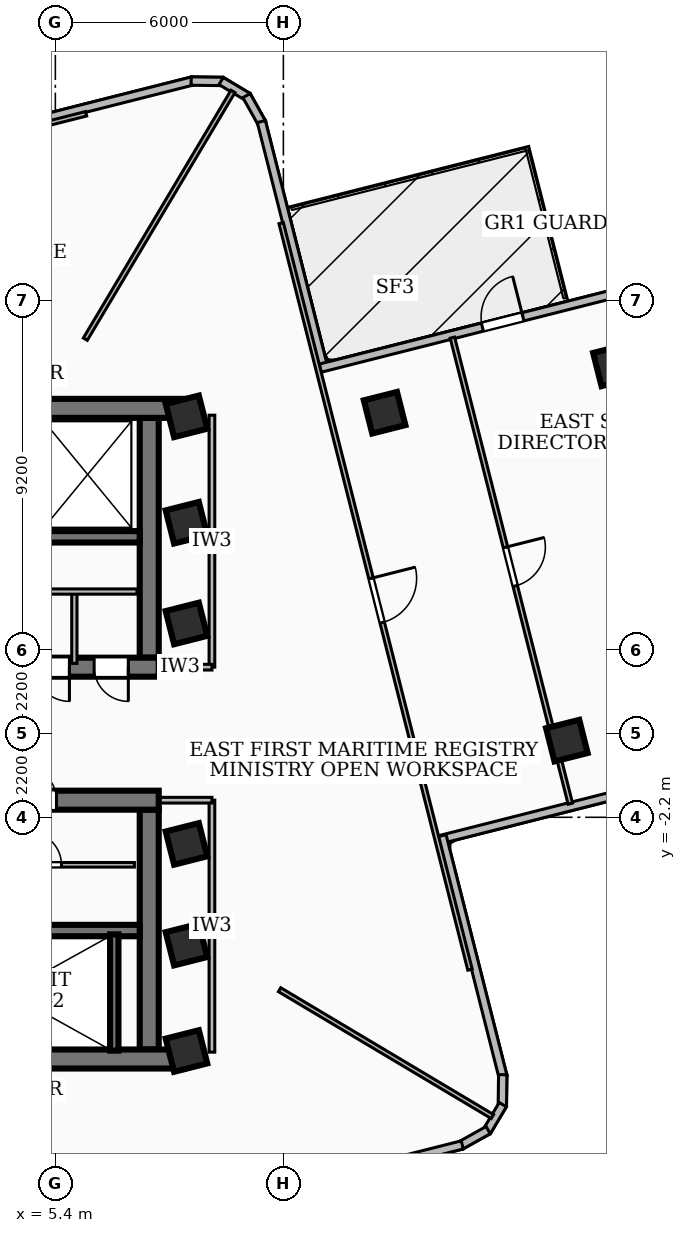
"""IFC4 building model, lengths in metres.
Left out: names, types, materials, properties, quantities, classifications, styles, units other than length and angle.
Written with IfcOpenShell. Run it as: python <this file> out.ifc"""

import sys

from ifc_helpers import new_model, si_unit, direction, frame, frame_2d, origin, origin_2d, place, context, subcontext, project, spatial, rectangle, extrude, element, fill, save


model = new_model("IFC4")
c1 = context("Model", 3, precision=1e-05, world=origin(), true_north=direction((0.0, 1.0)))
c2 = subcontext(c1, "Body", "Model", "MODEL_VIEW")
j1 = project(units=[si_unit("LENGTHUNIT", "METRE"), si_unit("PLANEANGLEUNIT", "RADIAN")], contexts=[c1])
p1 = place(None, origin())
s1 = spatial("IfcSite", under=j1, at=p1, CompositionType="ELEMENT")
p2 = place(p1, origin())
s2 = spatial("IfcBuilding", under=s1, at=p2, CompositionType="ELEMENT")
p3 = place(p2, frame((0.0, 0.0, 127.08)))
s3 = spatial("IfcBuildingStorey", under=s2, at=p3, CompositionType="ELEMENT", Elevation=127.08)
p4 = place(p3, frame((-8.78, 8.56, 0.0), z_axis=(0.0, 0.0, 1.0), x_axis=(1.0, 0.0, 0.0)))
e1 = element("IfcWall", 1, at=p4, inside=s3, PredefinedType="SHEAR", context=c2, shape_type="SweptSolid", body=[
    extrude(rectangle(XDim=17.56, YDim=0.5, at=frame_2d((8.78, 0.0))), origin(), (0.0, 0.0, 1.0), 3.34),
])
p5 = place(p3, frame((8.12, 1.75, 0.0), z_axis=(0.0, 0.0, 1.0), x_axis=(-1.0, 0.0, 0.0)))
e2 = element("IfcWall", 2, at=p5, inside=s3, PredefinedType="SHEAR", context=c2, shape_type="SweptSolid", body=[
    extrude(rectangle(XDim=16.24, YDim=0.5, at=frame_2d((8.12, 0.0))), origin(), (0.0, 0.0, 1.0), 3.34),
])
p6 = place(p5, frame((7.45, 0.0, 0.0)))
e3 = element("IfcOpeningElement", 3, at=p6, cuts=e2, PredefinedType="OPENING", context=c2, shape_type="SweptSolid", body=[
    extrude(rectangle(XDim=1.0, YDim=2.1, at=frame_2d((0.5, 1.05))), frame((0.0, 0.26, 0.0), z_axis=(0.0, -1.0, 0.0), x_axis=(1.0, 0.0, 0.0)), (0.0, 0.0, 1.0), 0.52),
])
p7 = place(p5, frame((3.85, 0.0, 0.0)))
e4 = element("IfcOpeningElement", 4, at=p7, cuts=e2, PredefinedType="OPENING", context=c2, shape_type="SweptSolid", body=[
    extrude(rectangle(XDim=0.9, YDim=2.06, at=frame_2d((0.45, 1.03))), frame((0.0, 0.26, 0.0), z_axis=(0.0, -1.0, 0.0), x_axis=(1.0, 0.0, 0.0)), (0.0, 0.0, 1.0), 0.52),
])
p8 = place(p5, frame((2.35, 0.0, 0.0)))
e5 = element("IfcOpeningElement", 5, at=p8, cuts=e2, PredefinedType="OPENING", context=c2, shape_type="SweptSolid", body=[
    extrude(rectangle(XDim=0.9, YDim=2.06, at=frame_2d((0.45, 1.03))), frame((0.0, 0.26, 0.0), z_axis=(0.0, -1.0, 0.0), x_axis=(1.0, 0.0, 0.0)), (0.0, 0.0, 1.0), 0.52),
])
p9 = place(p5, frame((0.8, 0.0, 0.0)))
e6 = element("IfcOpeningElement", 6, at=p9, cuts=e2, PredefinedType="OPENING", context=c2, shape_type="SweptSolid", body=[
    extrude(rectangle(XDim=0.9, YDim=2.06, at=frame_2d((0.45, 1.03))), frame((0.0, 0.26, 0.0), z_axis=(0.0, -1.0, 0.0), x_axis=(1.0, 0.0, 0.0)), (0.0, 0.0, 1.0), 0.52),
])
p10 = place(p3, frame((7.87, 8.31, 0.0), z_axis=(0.0, 0.0, 1.0), x_axis=(0.0, -1.0, 0.0)))
e7 = element("IfcWall", 7, at=p10, inside=s3, PredefinedType="SHEAR", context=c2, shape_type="SweptSolid", body=[
    extrude(rectangle(XDim=6.31, YDim=0.5, at=frame_2d((3.155, 0.0))), origin(), (0.0, 0.0, 1.0), 3.34),
])
p11 = place(p3, frame((7.62, 5.18, 0.0), z_axis=(0.0, 0.0, 1.0), x_axis=(-1.0, 0.0, 0.0)))
e8 = element("IfcWall", 8, at=p11, inside=s3, PredefinedType="SOLIDWALL", context=c2, shape_type="SweptSolid", body=[
    extrude(rectangle(XDim=15.24, YDim=0.3, at=frame_2d((7.62, 0.0))), origin(), (0.0, 0.0, 1.0), 3.34),
])
p12 = place(p11, frame((5.77, 0.0, 0.0)))
e9 = element("IfcOpeningElement", 9, at=p12, cuts=e8, PredefinedType="OPENING", context=c2, shape_type="SweptSolid", body=[
    extrude(rectangle(XDim=1.1, YDim=2.15, at=frame_2d((0.55, 1.075))), frame((0.0, 0.16, 0.0), z_axis=(0.0, -1.0, 0.0), x_axis=(1.0, 0.0, 0.0)), (0.0, 0.0, 1.0), 0.32),
])
p13 = place(p11, frame((2.97, 0.0, 0.0)))
e10 = element("IfcOpeningElement", 10, at=p13, cuts=e8, PredefinedType="OPENING", context=c2, shape_type="SweptSolid", body=[
    extrude(rectangle(XDim=1.1, YDim=2.15, at=frame_2d((0.55, 1.075))), frame((0.0, 0.16, 0.0), z_axis=(0.0, -1.0, 0.0), x_axis=(1.0, 0.0, 0.0)), (0.0, 0.0, 1.0), 0.32),
])
p14 = place(p11, frame((7.97, 0.0, 0.0)))
e11 = element("IfcOpeningElement", 11, at=p14, cuts=e8, PredefinedType="OPENING", context=c2, shape_type="SweptSolid", body=[
    extrude(rectangle(XDim=1.0, YDim=2.1, at=frame_2d((0.5, 1.05))), frame((0.0, 0.16, 0.0), z_axis=(0.0, -1.0, 0.0), x_axis=(1.0, 0.0, 0.0)), (0.0, 0.0, 1.0), 0.32),
])
p15 = place(p3, frame((8.78, -8.56, 0.0), z_axis=(0.0, 0.0, 1.0), x_axis=(-1.0, 0.0, 0.0)))
e12 = element("IfcWall", 12, at=p15, inside=s3, PredefinedType="SHEAR", context=c2, shape_type="SweptSolid", body=[
    extrude(rectangle(XDim=17.56, YDim=0.5, at=frame_2d((8.78, 0.0))), origin(), (0.0, 0.0, 1.0), 3.34),
])
p16 = place(p3, frame((-8.12, -1.75, 0.0), z_axis=(0.0, 0.0, 1.0), x_axis=(1.0, 0.0, 0.0)))
e13 = element("IfcWall", 13, at=p16, inside=s3, PredefinedType="SHEAR", context=c2, shape_type="SweptSolid", body=[
    extrude(rectangle(XDim=16.24, YDim=0.5, at=frame_2d((8.12, 0.0))), origin(), (0.0, 0.0, 1.0), 3.34),
])
p17 = place(p16, frame((7.45, 0.0, 0.0)))
e14 = element("IfcOpeningElement", 14, at=p17, cuts=e13, PredefinedType="OPENING", context=c2, shape_type="SweptSolid", body=[
    extrude(rectangle(XDim=1.0, YDim=2.1, at=frame_2d((0.5, 1.05))), frame((0.0, 0.26, 0.0), z_axis=(0.0, -1.0, 0.0), x_axis=(1.0, 0.0, 0.0)), (0.0, 0.0, 1.0), 0.52),
])
p18 = place(p16, frame((12.65, 0.0, 0.0)))
e15 = element("IfcOpeningElement", 15, at=p18, cuts=e13, PredefinedType="OPENING", context=c2, shape_type="SweptSolid", body=[
    extrude(rectangle(XDim=0.9, YDim=2.06, at=frame_2d((0.45, 1.03))), frame((0.0, 0.26, 0.0), z_axis=(0.0, -1.0, 0.0), x_axis=(1.0, 0.0, 0.0)), (0.0, 0.0, 1.0), 0.52),
])
p19 = place(p16, frame((0.565, 0.0, 0.0)))
e16 = element("IfcOpeningElement", 16, at=p19, cuts=e13, PredefinedType="OPENING", context=c2, shape_type="SweptSolid", body=[
    extrude(rectangle(XDim=1.05, YDim=2.15, at=frame_2d((0.525, 1.075))), frame((0.0, 0.26, 0.0), z_axis=(0.0, -1.0, 0.0), x_axis=(1.0, 0.0, 0.0)), (0.0, 0.0, 1.0), 0.52),
])
p20 = place(p16, frame((2.125, 0.0, 0.0)))
e17 = element("IfcOpeningElement", 17, at=p20, cuts=e13, PredefinedType="OPENING", context=c2, shape_type="SweptSolid", body=[
    extrude(rectangle(XDim=1.05, YDim=2.15, at=frame_2d((0.525, 1.075))), frame((0.0, 0.26, 0.0), z_axis=(0.0, -1.0, 0.0), x_axis=(1.0, 0.0, 0.0)), (0.0, 0.0, 1.0), 0.52),
])
p21 = place(p16, frame((3.685, 0.0, 0.0)))
e18 = element("IfcOpeningElement", 18, at=p21, cuts=e13, PredefinedType="OPENING", context=c2, shape_type="SweptSolid", body=[
    extrude(rectangle(XDim=1.05, YDim=2.15, at=frame_2d((0.525, 1.075))), frame((0.0, 0.26, 0.0), z_axis=(0.0, -1.0, 0.0), x_axis=(1.0, 0.0, 0.0)), (0.0, 0.0, 1.0), 0.52),
])
p22 = place(p3, frame((7.87, -2.0, 0.0), z_axis=(0.0, 0.0, 1.0), x_axis=(0.0, -1.0, 0.0)))
e19 = element("IfcWall", 19, at=p22, inside=s3, PredefinedType="SHEAR", context=c2, shape_type="SweptSolid", body=[
    extrude(rectangle(XDim=6.31, YDim=0.5, at=frame_2d((3.155, 0.0))), origin(), (0.0, 0.0, 1.0), 3.34),
])
p23 = place(p3, frame((-7.62, -5.18, 0.0), z_axis=(0.0, 0.0, 1.0), x_axis=(1.0, 0.0, 0.0)))
e20 = element("IfcWall", 20, at=p23, inside=s3, PredefinedType="SOLIDWALL", context=c2, shape_type="SweptSolid", body=[
    extrude(rectangle(XDim=15.24, YDim=0.3, at=frame_2d((7.62, 0.0))), origin(), (0.0, 0.0, 1.0), 3.34),
])
p24 = place(p23, frame((5.77, 0.0, 0.0)))
e21 = element("IfcOpeningElement", 21, at=p24, cuts=e20, PredefinedType="OPENING", context=c2, shape_type="SweptSolid", body=[
    extrude(rectangle(XDim=1.1, YDim=2.15, at=frame_2d((0.55, 1.075))), frame((0.0, 0.16, 0.0), z_axis=(0.0, -1.0, 0.0), x_axis=(1.0, 0.0, 0.0)), (0.0, 0.0, 1.0), 0.32),
])
p25 = place(p23, frame((7.97, 0.0, 0.0)))
e22 = element("IfcOpeningElement", 22, at=p25, cuts=e20, PredefinedType="OPENING", context=c2, shape_type="SweptSolid", body=[
    extrude(rectangle(XDim=1.0, YDim=2.1, at=frame_2d((0.5, 1.05))), frame((0.0, 0.16, 0.0), z_axis=(0.0, -1.0, 0.0), x_axis=(1.0, 0.0, 0.0)), (0.0, 0.0, 1.0), 0.32),
])
p26 = place(p3, frame((6.95, -8.34, 0.0), z_axis=(0.0, 0.0, 1.0), x_axis=(0.0, 1.0, 0.0)))
e23 = element("IfcWall", 23, at=p26, inside=s3, PredefinedType="SOLIDWALL", context=c2, shape_type="SweptSolid", body=[
    extrude(rectangle(XDim=3.06, YDim=0.22, at=frame_2d((1.53, 0.0))), origin(), (0.0, 0.0, 1.0), 3.34),
])
for number, where, z_axis, x_axis in (
    (24, (8.85, -5.55, 0.0), (0.0, 0.0, 1.0), (0.969, 0.245, 0.0)),
    (25, (8.85, -2.9, 0.0), (0.0, 0.0, 1.0), (0.969, 0.245, 0.0)),
    (26, (8.85, 2.9, 0.0), (0.0, 0.0, 1.0), (0.969, 0.245, 0.0)),
    (27, (8.85, 5.55, 0.0), (0.0, 0.0, 1.0), (0.969, 0.245, 0.0)),
    (28, (8.85, -8.35, 0.0), (0.0, 0.0, 1.0), (0.969, 0.245, 0.0)),
    (29, (8.85, 8.35, 0.0), (0.0, 0.0, 1.0), (0.969, 0.245, 0.0)),
    (30, (18.86, -0.183, 0.0), (0.0, 0.0, 1.0), (0.969, 0.245, 0.0)),
    (31, (14.064, 8.445, 0.0), (0.0, 0.0, 1.0), (0.969, 0.245, 0.0)),
    (32, (20.098, 9.692, 0.0), (0.0, 0.0, 1.0), (0.969, 0.245, 0.0)),
):
    element("IfcColumn", number, at=place(p3, frame(where, z_axis=z_axis, x_axis=x_axis)), inside=s3, PredefinedType="COLUMN", context=c2, shape_type="SweptSolid", body=[
        extrude(rectangle(XDim=0.9, YDim=0.9, at=origin_2d()), origin(), (0.0, 0.0, 1.0), 3.6),
    ])
p27 = place(p3, frame((2.684, 15.574, 0.0), z_axis=(0.0, 0.0, 1.0), x_axis=(0.969435490349, 0.245346347134, 0.0)))
e33 = element("IfcWall", 33, at=p27, inside=s3, PredefinedType="SOLIDWALL", context=c2, shape_type="SweptSolid", body=[
    extrude(rectangle(XDim=6.538, YDim=0.22, at=frame_2d((3.269, 0.0))), origin(), (0.0, 0.0, 1.0), 2.57),
])
p28 = place(p3, frame((8.973, 17.172, 0.0), z_axis=(0.0, 0.0, 1.0), x_axis=(0.999909345183, -0.013464821393, 0.0)))
e34 = element("IfcWall", 34, at=p28, inside=s3, PredefinedType="SOLIDWALL", context=c2, shape_type="SweptSolid", body=[
    extrude(rectangle(XDim=0.834, YDim=0.22, at=frame_2d((0.417, 0.0))), origin(), (0.0, 0.0, 1.0), 3.34),
])
p29 = place(p3, frame((9.761, 17.174, 0.0), z_axis=(0.0, 0.0, 1.0), x_axis=(0.858412031951, -0.512960801038, 0.0)))
e35 = element("IfcWall", 35, at=p29, inside=s3, PredefinedType="SOLIDWALL", context=c2, shape_type="SweptSolid", body=[
    extrude(rectangle(XDim=0.819, YDim=0.22, at=frame_2d((0.41, 0.0))), origin(), (0.0, 0.0, 1.0), 3.34),
])
p30 = place(p3, frame((10.431, 16.789, 0.0), z_axis=(0.0, 0.0, 1.0), x_axis=(0.487952561671, -0.872870149311, 0.0)))
e36 = element("IfcWall", 36, at=p30, inside=s3, PredefinedType="SOLIDWALL", context=c2, shape_type="SweptSolid", body=[
    extrude(rectangle(XDim=0.834, YDim=0.22, at=frame_2d((0.417, 0.0))), origin(), (0.0, 0.0, 1.0), 3.34),
])
p31 = place(p3, frame((10.82, 16.107, 0.0), z_axis=(0.0, 0.0, 1.0), x_axis=(0.245314006561, -0.969443674581, 0.0)))
e37 = element("IfcWall", 37, at=p31, inside=s3, PredefinedType="SOLIDWALL", context=c2, shape_type="SweptSolid", body=[
    extrude(rectangle(XDim=6.759, YDim=0.22, at=frame_2d((3.379, 0.0))), origin(), (0.0, 0.0, 1.0), 2.644),
])
p32 = place(p3, frame((12.371, 9.618, 0.0), z_axis=(0.0, 0.0, 1.0), x_axis=(0.969434127448, 0.245351732293, 0.0)))
e38 = element("IfcWall", 38, at=p32, inside=s3, PredefinedType="SOLIDWALL", context=c2, shape_type="SweptSolid", body=[
    extrude(rectangle(XDim=13.458, YDim=0.22, at=frame_2d((6.729, 0.0))), origin(), (0.0, 0.0, 1.0), 2.644),
])
p33 = place(p32, frame((4.4, 0.0, 0.0)))
e39 = element("IfcOpeningElement", 39, at=p33, cuts=e38, PredefinedType="OPENING", context=c2, shape_type="SweptSolid", body=[
    extrude(rectangle(XDim=1.1, YDim=2.1, at=frame_2d((0.55, 1.05))), frame((0.0, 0.12, 0.0), z_axis=(0.0, -1.0, 0.0), x_axis=(1.0, 0.0, 0.0)), (0.0, 0.0, 1.0), 0.24),
])
p34 = place(p3, frame((28.557, 0.511, 0.0), z_axis=(0.0, 0.0, 1.0), x_axis=(-0.969429758912, -0.245368992613, 0.0)))
e40 = element("IfcWall", 40, at=p34, inside=s3, PredefinedType="SOLIDWALL", context=c2, shape_type="SweptSolid", body=[
    extrude(rectangle(XDim=13.457, YDim=0.22, at=frame_2d((6.729, 0.0))), origin(), (0.0, 0.0, 1.0), 3.34),
])
p35 = place(p34, frame((4.35, 0.0, 0.85)))
e41 = element("IfcOpeningElement", 41, at=p35, cuts=e40, PredefinedType="OPENING", context=c2, shape_type="SweptSolid", body=[
    extrude(rectangle(XDim=2.7, YDim=1.65, at=frame_2d((1.35, 0.825))), frame((0.0, 0.12, 0.0), z_axis=(0.0, -1.0, 0.0), x_axis=(1.0, 0.0, 0.0)), (0.0, 0.0, 1.0), 0.24),
])
p36 = place(p3, frame((15.574, -2.684, 0.0), z_axis=(0.0, 0.0, 1.0), x_axis=(0.245346347134, -0.969435490349, 0.0)))
e42 = element("IfcWall", 42, at=p36, inside=s3, PredefinedType="SOLIDWALL", context=c2, shape_type="SweptSolid", body=[
    extrude(rectangle(XDim=6.538, YDim=0.22, at=frame_2d((3.269, 0.0))), origin(), (0.0, 0.0, 1.0), 3.34),
])
p37 = place(p3, frame((17.172, -8.973, 0.0), z_axis=(0.0, 0.0, 1.0), x_axis=(-0.013464821393, -0.999909345183, 0.0)))
e43 = element("IfcWall", 43, at=p37, inside=s3, PredefinedType="SOLIDWALL", context=c2, shape_type="SweptSolid", body=[
    extrude(rectangle(XDim=0.834, YDim=0.22, at=frame_2d((0.417, 0.0))), origin(), (0.0, 0.0, 1.0), 3.34),
])
p38 = place(p3, frame((17.174, -9.761, 0.0), z_axis=(0.0, 0.0, 1.0), x_axis=(-0.512960801038, -0.858412031951, 0.0)))
e44 = element("IfcWall", 44, at=p38, inside=s3, PredefinedType="SOLIDWALL", context=c2, shape_type="SweptSolid", body=[
    extrude(rectangle(XDim=0.819, YDim=0.22, at=frame_2d((0.41, 0.0))), origin(), (0.0, 0.0, 1.0), 3.34),
])
p39 = place(p3, frame((16.789, -10.431, 0.0), z_axis=(0.0, 0.0, 1.0), x_axis=(-0.872870149311, -0.487952561671, 0.0)))
e45 = element("IfcWall", 45, at=p39, inside=s3, PredefinedType="SOLIDWALL", context=c2, shape_type="SweptSolid", body=[
    extrude(rectangle(XDim=0.834, YDim=0.22, at=frame_2d((0.417, 0.0))), origin(), (0.0, 0.0, 1.0), 3.34),
])
p40 = place(p3, frame((16.107, -10.82, 0.0), z_axis=(0.0, 0.0, 1.0), x_axis=(-0.969443674581, -0.245314006561, 0.0)))
e46 = element("IfcWall", 46, at=p40, inside=s3, PredefinedType="SOLIDWALL", context=c2, shape_type="SweptSolid", body=[
    extrude(rectangle(XDim=6.759, YDim=0.22, at=frame_2d((3.379, 0.0))), origin(), (0.0, 0.0, 1.0), 3.34),
])
p41 = place(p3, frame((2.9, 3.74, 0.0), z_axis=(0.0, 0.0, 1.0), x_axis=(1.0, 0.0, 0.0)))
e47 = element("IfcWall", 47, at=p41, inside=s3, PredefinedType="PARTITIONING", context=c2, shape_type="SweptSolid", body=[
    extrude(rectangle(XDim=4.65, YDim=0.138, at=frame_2d((2.325, 0.0))), origin(), (0.0, 0.0, 1.0), 3.34),
])
p42 = place(p3, frame((2.8, -3.45, 0.0), z_axis=(0.0, 0.0, 1.0), x_axis=(1.0, 0.0, 0.0)))
e48 = element("IfcWall", 48, at=p42, inside=s3, PredefinedType="PARTITIONING", context=c2, shape_type="SweptSolid", body=[
    extrude(rectangle(XDim=4.68, YDim=0.12, at=frame_2d((2.34, 0.0))), origin(), (0.0, 0.0, 1.0), 3.34),
])
p43 = place(p42, frame((1.9, 0.0, 0.0)))
e49 = element("IfcOpeningElement", 49, at=p43, cuts=e48, PredefinedType="OPENING", context=c2, shape_type="SweptSolid", body=[
    extrude(rectangle(XDim=0.86, YDim=2.04, at=frame_2d((0.43, 1.02))), frame((0.0, 0.07, 0.0), z_axis=(0.0, -1.0, 0.0), x_axis=(1.0, 0.0, 0.0)), (0.0, 0.0, 1.0), 0.14),
])
p44 = place(p3, frame((5.9, 1.85, 0.0), z_axis=(0.0, 0.0, 1.0), x_axis=(0.0, 1.0, 0.0)))
e50 = element("IfcWall", 50, at=p44, inside=s3, PredefinedType="PARTITIONING", context=c2, shape_type="SweptSolid", body=[
    extrude(rectangle(XDim=1.89, YDim=0.138, at=frame_2d((0.945, 0.0))), origin(), (0.0, 0.0, 1.0), 2.57),
])
p45 = place(p3, frame((9.52, 1.75, 0.0), z_axis=(0.0, 0.0, 1.0), x_axis=(0.0, 1.0, 0.0)))
e51 = element("IfcWall", 51, at=p45, inside=s3, PredefinedType="PARTITIONING", context=c2, shape_type="SweptSolid", body=[
    extrude(rectangle(XDim=6.63, YDim=0.15, at=frame_2d((3.315, 0.0))), origin(), (0.0, 0.0, 1.0), 2.57),
])
p46 = place(p3, frame((7.85, 1.75, 0.0), z_axis=(0.0, 0.0, 1.0), x_axis=(1.0, 0.0, 0.0)))
e52 = element("IfcWall", 52, at=p46, inside=s3, PredefinedType="PARTITIONING", context=c2, shape_type="SweptSolid", body=[
    extrude(rectangle(XDim=1.67, YDim=0.15, at=frame_2d((0.835, 0.0))), origin(), (0.0, 0.0, 1.0), 2.57),
])
p47 = place(p3, frame((9.52, -8.38, 0.0), z_axis=(0.0, 0.0, 1.0), x_axis=(0.0, 1.0, 0.0)))
e53 = element("IfcWall", 53, at=p47, inside=s3, PredefinedType="PARTITIONING", context=c2, shape_type="SweptSolid", body=[
    extrude(rectangle(XDim=6.63, YDim=0.15, at=frame_2d((3.315, 0.0))), origin(), (0.0, 0.0, 1.0), 2.57),
])
p48 = place(p3, frame((7.85, -1.75, 0.0), z_axis=(0.0, 0.0, 1.0), x_axis=(1.0, 0.0, 0.0)))
e54 = element("IfcWall", 54, at=p48, inside=s3, PredefinedType="PARTITIONING", context=c2, shape_type="SweptSolid", body=[
    extrude(rectangle(XDim=1.67, YDim=0.15, at=frame_2d((0.835, 0.0))), origin(), (0.0, 0.0, 1.0), 2.57),
])
p49 = place(p3, frame((6.188, 10.38, 0.0), z_axis=(0.0, 0.0, 1.0), x_axis=(0.511972353143, 0.859001926434, 0.0)))
e55 = element("IfcWall", 55, at=p49, inside=s3, PredefinedType="PARTITIONING", context=c2, shape_type="SweptSolid", body=[
    extrude(rectangle(XDim=7.59, YDim=0.12, at=frame_2d((3.795, 0.0))), origin(), (0.0, 0.0, 1.0), 2.57),
])
p50 = place(p3, frame((11.3, -6.736, 0.0), z_axis=(0.0, 0.0, 1.0), x_axis=(0.858979599017, -0.512009812868, 0.0)))
e56 = element("IfcWall", 56, at=p50, inside=s3, PredefinedType="PARTITIONING", context=c2, shape_type="SweptSolid", body=[
    extrude(rectangle(XDim=6.519, YDim=0.12, at=frame_2d((3.26, 0.0))), origin(), (0.0, 0.0, 1.0), 3.34),
])
p51 = place(p3, frame((11.342, 13.433, 0.0), z_axis=(0.0, 0.0, 1.0), x_axis=(0.24525085526, -0.969459652587, 0.0)))
e57 = element("IfcWall", 57, at=p51, inside=s3, PredefinedType="PARTITIONING", context=c2, shape_type="SweptSolid", body=[
    extrude(rectangle(XDim=20.261, YDim=0.12, at=frame_2d((10.13, 0.0))), origin(), (0.0, 0.0, 1.0), 2.57),
])
p52 = place(p51, frame((9.64, 0.0, 0.0)))
e58 = element("IfcOpeningElement", 58, at=p52, cuts=e57, PredefinedType="OPENING", context=c2, shape_type="SweptSolid", body=[
    extrude(rectangle(XDim=1.2, YDim=2.1, at=frame_2d((0.6, 1.05))), frame((0.0, 0.07, 0.0), z_axis=(0.0, -1.0, 0.0), x_axis=(1.0, 0.0, 0.0)), (0.0, 0.0, 1.0), 0.14),
])
p53 = place(p3, frame((15.848, 10.421, 0.0), z_axis=(0.0, 0.0, 1.0), x_axis=(0.24530936383, -0.969444849394, 0.0)))
e59 = element("IfcWall", 59, at=p53, inside=s3, PredefinedType="PARTITIONING", context=c2, shape_type="SweptSolid", body=[
    extrude(rectangle(XDim=12.649, YDim=0.12, at=frame_2d((6.325, 0.0))), origin(), (0.0, 0.0, 1.0), 2.57),
])
p54 = place(p53, frame((5.69, 0.0, 0.0)))
e60 = element("IfcOpeningElement", 60, at=p54, cuts=e59, PredefinedType="OPENING", context=c2, shape_type="SweptSolid", body=[
    extrude(rectangle(XDim=1.05, YDim=2.08, at=frame_2d((0.525, 1.04))), frame((0.0, 0.07, 0.0), z_axis=(0.0, -1.0, 0.0), x_axis=(1.0, 0.0, 0.0)), (0.0, 0.0, 1.0), 0.14),
])
p55 = place(p3, frame((-13.433, 11.342, 0.0), z_axis=(0.0, 0.0, 1.0), x_axis=(0.969459652587, 0.24525085526, 0.0)))
e61 = element("IfcWall", 61, at=p55, inside=s3, PredefinedType="PARTITIONING", context=c2, shape_type="SweptSolid", body=[
    extrude(rectangle(XDim=20.261, YDim=0.12, at=frame_2d((10.13, 0.0))), origin(), (0.0, 0.0, 1.0), 2.57),
])
p56 = place(p55, frame((9.64, 0.0, 0.0)))
e62 = element("IfcOpeningElement", 62, at=p56, cuts=e61, PredefinedType="OPENING", context=c2, shape_type="SweptSolid", body=[
    extrude(rectangle(XDim=1.2, YDim=2.1, at=frame_2d((0.6, 1.05))), frame((0.0, 0.07, 0.0), z_axis=(0.0, -1.0, 0.0), x_axis=(1.0, 0.0, 0.0)), (0.0, 0.0, 1.0), 0.14),
])
p57 = place(p33, origin())
e63 = element("IfcDoor", 63, at=p57, inside=s3, OperationType="SINGLE_SWING_RIGHT", PredefinedType="DOOR", context=c2, shape_type="SweptSolid", body=[
    extrude(rectangle(XDim=1.1, YDim=2.1, at=frame_2d((0.55, 1.05))), frame((0.0, 0.025, 0.0), z_axis=(0.0, -1.0, 0.0), x_axis=(1.0, 0.0, 0.0)), (0.0, 0.0, 1.0), 0.05),
])
fill(e39, e63)
p58 = place(p18, origin())
e64 = element("IfcDoor", 64, at=p58, inside=s3, OperationType="SINGLE_SWING_LEFT", PredefinedType="DOOR", context=c2, shape_type="SweptSolid", body=[
    extrude(rectangle(XDim=0.9, YDim=2.06, at=frame_2d((0.45, 1.03))), frame((0.0, 0.025, 0.0), z_axis=(0.0, -1.0, 0.0), x_axis=(1.0, 0.0, 0.0)), (0.0, 0.0, 1.0), 0.05),
])
fill(e15, e64)
p59 = place(p8, origin())
e65 = element("IfcDoor", 65, at=p59, inside=s3, OperationType="SINGLE_SWING_LEFT", PredefinedType="DOOR", context=c2, shape_type="SweptSolid", body=[
    extrude(rectangle(XDim=0.9, YDim=2.06, at=frame_2d((0.45, 1.03))), frame((0.0, 0.025, 0.0), z_axis=(0.0, -1.0, 0.0), x_axis=(1.0, 0.0, 0.0)), (0.0, 0.0, 1.0), 0.05),
])
fill(e5, e65)
p60 = place(p9, origin())
e66 = element("IfcDoor", 66, at=p60, inside=s3, OperationType="SINGLE_SWING_LEFT", PredefinedType="DOOR", context=c2, shape_type="SweptSolid", body=[
    extrude(rectangle(XDim=0.9, YDim=2.06, at=frame_2d((0.45, 1.03))), frame((0.0, 0.025, 0.0), z_axis=(0.0, -1.0, 0.0), x_axis=(1.0, 0.0, 0.0)), (0.0, 0.0, 1.0), 0.05),
])
fill(e6, e66)
p61 = place(p43, origin())
e67 = element("IfcDoor", 67, at=p61, inside=s3, OperationType="SINGLE_SWING_LEFT", PredefinedType="DOOR", context=c2, shape_type="SweptSolid", body=[
    extrude(rectangle(XDim=0.86, YDim=2.04, at=frame_2d((0.43, 1.02))), frame((0.0, 0.025, 0.0), z_axis=(0.0, -1.0, 0.0), x_axis=(1.0, 0.0, 0.0)), (0.0, 0.0, 1.0), 0.05),
])
fill(e49, e67)
p62 = place(p52, origin())
e68 = element("IfcDoor", 68, at=p62, inside=s3, OperationType="SINGLE_SWING_LEFT", PredefinedType="DOOR", context=c2, shape_type="SweptSolid", body=[
    extrude(rectangle(XDim=1.2, YDim=2.1, at=frame_2d((0.6, 1.05))), frame((0.0, 0.025, 0.0), z_axis=(0.0, -1.0, 0.0), x_axis=(1.0, 0.0, 0.0)), (0.0, 0.0, 1.0), 0.05),
])
fill(e58, e68)
p63 = place(p54, origin())
e69 = element("IfcDoor", 69, at=p63, inside=s3, OperationType="SINGLE_SWING_LEFT", PredefinedType="DOOR", context=c2, shape_type="SweptSolid", body=[
    extrude(rectangle(XDim=1.05, YDim=2.08, at=frame_2d((0.525, 1.04))), frame((0.0, 0.025, 0.0), z_axis=(0.0, -1.0, 0.0), x_axis=(1.0, 0.0, 0.0)), (0.0, 0.0, 1.0), 0.05),
])
fill(e60, e69)
save(model, sys.argv[1])
